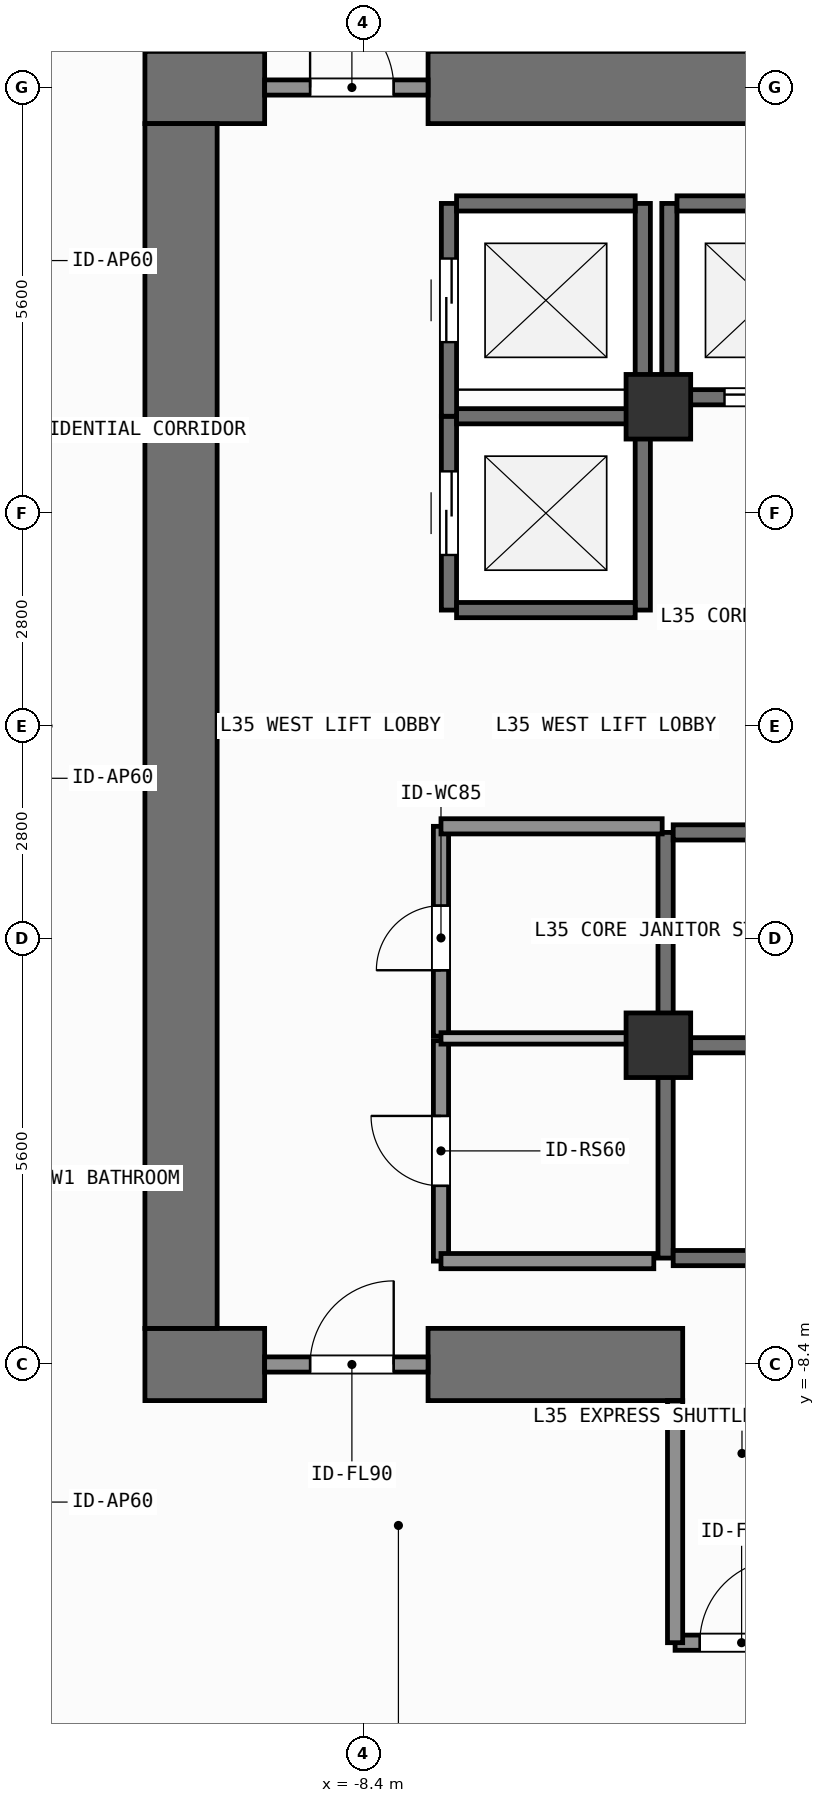
"""IFC4 building model, lengths in metres.
Left out: names, types, materials, properties, quantities, classifications, styles, units other than length and angle.
Written with IfcOpenShell. Run it as: python <this file> out.ifc"""

import sys

from ifc_helpers import new_model, si_unit, direction, frame, frame_2d, origin, origin_2d, place, context, subcontext, project, spatial, rectangle, extrude, element, fill, save


model = new_model("IFC4")
c1 = context("Model", 3, precision=1e-05, world=origin(), true_north=direction((0.0, 1.0)))
c2 = subcontext(c1, "Body", "Model", "MODEL_VIEW")
j1 = project(units=[si_unit("LENGTHUNIT", "METRE"), si_unit("PLANEANGLEUNIT", "RADIAN")], contexts=[c1])
p1 = place(None, origin())
s1 = spatial("IfcSite", under=j1, at=p1, CompositionType="ELEMENT")
p2 = place(p1, origin())
s2 = spatial("IfcBuilding", under=s1, at=p2, CompositionType="ELEMENT")
p3 = place(p2, frame((0.0, 0.0, 140.7)))
s3 = spatial("IfcBuildingStorey", under=s2, at=p3, CompositionType="ELEMENT", Elevation=140.7)
p4 = place(p3, frame((-11.275, -8.4, 0.0), z_axis=(0.0, 0.0, 1.0), x_axis=(1.0, 0.0, 0.0)))
e1 = element("IfcWall", 1, at=p4, inside=s3, PredefinedType="SHEAR", context=c2, shape_type="SweptSolid", body=[
    extrude(rectangle(XDim=1.575, YDim=0.95, at=frame_2d((0.788, 0.0))), origin(), (0.0, 0.0, 1.0), 3.9),
])
p5 = place(p3, frame((-7.55, -8.4, 0.0), z_axis=(0.0, 0.0, 1.0), x_axis=(1.0, 0.0, 0.0)))
e2 = element("IfcWall", 2, at=p5, inside=s3, PredefinedType="SHEAR", context=c2, shape_type="SweptSolid", body=[
    extrude(rectangle(XDim=3.35, YDim=0.95, at=frame_2d((1.675, 0.0))), origin(), (0.0, 0.0, 1.0), 3.9),
])
p6 = place(p3, frame((-11.275, 8.4, 0.0), z_axis=(0.0, 0.0, 1.0), x_axis=(1.0, 0.0, 0.0)))
e3 = element("IfcWall", 3, at=p6, inside=s3, PredefinedType="SHEAR", context=c2, shape_type="SweptSolid", body=[
    extrude(rectangle(XDim=1.575, YDim=0.95, at=frame_2d((0.788, 0.0))), origin(), (0.0, 0.0, 1.0), 3.9),
])
p7 = place(p3, frame((-7.55, 8.4, 0.0), z_axis=(0.0, 0.0, 1.0), x_axis=(1.0, 0.0, 0.0)))
e4 = element("IfcWall", 4, at=p7, inside=s3, PredefinedType="SHEAR", context=c2, shape_type="SweptSolid", body=[
    extrude(rectangle(XDim=16.425, YDim=0.95, at=frame_2d((8.212, 0.0))), origin(), (0.0, 0.0, 1.0), 3.9),
])
p8 = place(p3, frame((-10.8, -7.925, 0.0), z_axis=(0.0, 0.0, 1.0), x_axis=(0.0, 1.0, 0.0)))
e5 = element("IfcWall", 5, at=p8, inside=s3, PredefinedType="SHEAR", context=c2, shape_type="SweptSolid", body=[
    extrude(rectangle(XDim=15.85, YDim=0.95, at=frame_2d((7.925, 0.0))), origin(), (0.0, 0.0, 1.0), 3.9),
])
for number, where, z_axis, x_axis in (
    (6, (-4.52, -4.2, 0.0), (0.0, 0.0, 1.0), (1.0, 0.0, 0.0)),
    (7, (-4.52, 4.2, 0.0), (0.0, 0.0, 1.0), (1.0, 0.0, 0.0)),
):
    element("IfcColumn", number, at=place(p3, frame(where, z_axis=z_axis, x_axis=x_axis)), inside=s3, PredefinedType="COLUMN", context=c2, shape_type="SweptSolid", body=[
        extrude(rectangle(XDim=0.85, YDim=0.85, at=origin_2d()), origin(), (0.0, 0.0, 1.0), 3.9),
    ])
p9 = place(p3, frame((-7.275, 1.525, 0.0), z_axis=(0.0, 0.0, 1.0), x_axis=(0.0, 1.0, 0.0)))
e8 = element("IfcWall", 8, at=p9, inside=s3, PredefinedType="SHEAR", context=c2, shape_type="SweptSolid", body=[
    extrude(rectangle(XDim=2.55, YDim=0.2, at=frame_2d((1.275, 0.0))), origin(), (0.0, 0.0, 1.0), 3.68),
])
p10 = place(p9, frame((0.725, 0.0, 0.0)))
e9 = element("IfcOpeningElement", 9, at=p10, cuts=e8, PredefinedType="OPENING", context=c2, shape_type="SweptSolid", body=[
    extrude(rectangle(XDim=1.1, YDim=2.2, at=frame_2d((0.55, 1.1))), frame((0.0, 0.11, 0.0), z_axis=(0.0, -1.0, 0.0), x_axis=(1.0, 0.0, 0.0)), (0.0, 0.0, 1.0), 0.22),
])
p11 = place(p3, frame((-4.725, 1.525, 0.0), z_axis=(0.0, 0.0, 1.0), x_axis=(0.0, 1.0, 0.0)))
e10 = element("IfcWall", 10, at=p11, inside=s3, PredefinedType="SHEAR", context=c2, shape_type="SweptSolid", body=[
    extrude(rectangle(XDim=2.55, YDim=0.2, at=frame_2d((1.275, 0.0))), origin(), (0.0, 0.0, 1.0), 3.68),
])
for number, where, z_axis, x_axis in (
    (11, (-7.175, 1.525, 0.0), (0.0, 0.0, 1.0), (1.0, 0.0, 0.0)),
    (12, (-7.175, 4.075, 0.0), (0.0, 0.0, 1.0), (1.0, 0.0, 0.0)),
):
    element("IfcWall", number, at=place(p3, frame(where, z_axis=z_axis, x_axis=x_axis)), inside=s3, PredefinedType="SHEAR", context=c2, shape_type="SweptSolid", body=[
        extrude(rectangle(XDim=2.35, YDim=0.2, at=frame_2d((1.175, 0.0))), origin(), (0.0, 0.0, 1.0), 3.68),
    ])
p12 = place(p3, frame((-7.275, 4.075, 0.0), z_axis=(0.0, 0.0, 1.0), x_axis=(0.0, 1.0, 0.0)))
e13 = element("IfcWall", 13, at=p12, inside=s3, PredefinedType="SHEAR", context=c2, shape_type="SweptSolid", body=[
    extrude(rectangle(XDim=2.8, YDim=0.2, at=frame_2d((1.4, 0.0))), origin(), (0.0, 0.0, 1.0), 3.68),
])
p13 = place(p12, frame((0.975, 0.0, 0.0)))
e14 = element("IfcOpeningElement", 14, at=p13, cuts=e13, PredefinedType="OPENING", context=c2, shape_type="SweptSolid", body=[
    extrude(rectangle(XDim=1.1, YDim=2.2, at=frame_2d((0.55, 1.1))), frame((0.0, 0.11, 0.0), z_axis=(0.0, -1.0, 0.0), x_axis=(1.0, 0.0, 0.0)), (0.0, 0.0, 1.0), 0.22),
])
p14 = place(p3, frame((-4.725, 4.075, 0.0), z_axis=(0.0, 0.0, 1.0), x_axis=(0.0, 1.0, 0.0)))
e15 = element("IfcWall", 15, at=p14, inside=s3, PredefinedType="SHEAR", context=c2, shape_type="SweptSolid", body=[
    extrude(rectangle(XDim=2.8, YDim=0.2, at=frame_2d((1.4, 0.0))), origin(), (0.0, 0.0, 1.0), 3.68),
])
p15 = place(p3, frame((-7.175, 6.875, 0.0), z_axis=(0.0, 0.0, 1.0), x_axis=(1.0, 0.0, 0.0)))
e16 = element("IfcWall", 16, at=p15, inside=s3, PredefinedType="SHEAR", context=c2, shape_type="SweptSolid", body=[
    extrude(rectangle(XDim=2.35, YDim=0.2, at=frame_2d((1.175, 0.0))), origin(), (0.0, 0.0, 1.0), 3.68),
])
p16 = place(p3, frame((-4.375, 4.325, 0.0), z_axis=(0.0, 0.0, 1.0), x_axis=(0.0, 1.0, 0.0)))
e17 = element("IfcWall", 17, at=p16, inside=s3, PredefinedType="SHEAR", context=c2, shape_type="SweptSolid", body=[
    extrude(rectangle(XDim=2.55, YDim=0.2, at=frame_2d((1.275, 0.0))), origin(), (0.0, 0.0, 1.0), 3.68),
])
p17 = place(p3, frame((-4.275, 4.325, 0.0), z_axis=(0.0, 0.0, 1.0), x_axis=(1.0, 0.0, 0.0)))
e18 = element("IfcWall", 18, at=p17, inside=s3, PredefinedType="SHEAR", context=c2, shape_type="SweptSolid", body=[
    extrude(rectangle(XDim=2.35, YDim=0.2, at=frame_2d((1.175, 0.0))), origin(), (0.0, 0.0, 1.0), 3.68),
])
p18 = place(p17, frame((0.625, 0.0, 0.0)))
e19 = element("IfcOpeningElement", 19, at=p18, cuts=e18, PredefinedType="OPENING", context=c2, shape_type="SweptSolid", body=[
    extrude(rectangle(XDim=1.1, YDim=2.2, at=frame_2d((0.55, 1.1))), frame((0.0, 0.11, 0.0), z_axis=(0.0, -1.0, 0.0), x_axis=(1.0, 0.0, 0.0)), (0.0, 0.0, 1.0), 0.22),
])
p19 = place(p3, frame((-4.275, 6.875, 0.0), z_axis=(0.0, 0.0, 1.0), x_axis=(1.0, 0.0, 0.0)))
e20 = element("IfcWall", 20, at=p19, inside=s3, PredefinedType="SHEAR", context=c2, shape_type="SweptSolid", body=[
    extrude(rectangle(XDim=2.35, YDim=0.2, at=frame_2d((1.175, 0.0))), origin(), (0.0, 0.0, 1.0), 3.68),
])
p20 = place(p3, frame((-4.425, -7.0, 0.0), z_axis=(0.0, 0.0, 1.0), x_axis=(0.0, 1.0, 0.0)))
e21 = element("IfcWall", 21, at=p20, inside=s3, PredefinedType="SHEAR", context=c2, shape_type="SweptSolid", body=[
    extrude(rectangle(XDim=2.8, YDim=0.2, at=frame_2d((1.4, 0.0))), origin(), (0.0, 0.0, 1.0), 3.68),
])
for number, where, z_axis, x_axis in (
    (22, (-4.325, -7.0, 0.0), (0.0, 0.0, 1.0), (1.0, 0.0, 0.0)),
    (23, (-4.325, -4.2, 0.0), (0.0, 0.0, 1.0), (1.0, 0.0, 0.0)),
):
    element("IfcWall", number, at=place(p3, frame(where, z_axis=z_axis, x_axis=x_axis)), inside=s3, PredefinedType="SHEAR", context=c2, shape_type="SweptSolid", body=[
        extrude(rectangle(XDim=2.45, YDim=0.2, at=frame_2d((1.225, 0.0))), origin(), (0.0, 0.0, 1.0), 3.68),
    ])
p21 = place(p3, frame((-4.425, -4.2, 0.0), z_axis=(0.0, 0.0, 1.0), x_axis=(0.0, 1.0, 0.0)))
e24 = element("IfcWall", 24, at=p21, inside=s3, PredefinedType="SHEAR", context=c2, shape_type="SweptSolid", body=[
    extrude(rectangle(XDim=2.8, YDim=0.2, at=frame_2d((1.4, 0.0))), origin(), (0.0, 0.0, 1.0), 3.68),
])
p22 = place(p3, frame((-4.325, -1.4, 0.0), z_axis=(0.0, 0.0, 1.0), x_axis=(1.0, 0.0, 0.0)))
e25 = element("IfcWall", 25, at=p22, inside=s3, PredefinedType="SHEAR", context=c2, shape_type="SweptSolid", body=[
    extrude(rectangle(XDim=2.45, YDim=0.2, at=frame_2d((1.225, 0.0))), origin(), (0.0, 0.0, 1.0), 3.68),
])
p23 = place(p3, frame((-9.7, -8.4, 0.0), z_axis=(0.0, 0.0, 1.0), x_axis=(1.0, 0.0, 0.0)))
e26 = element("IfcWall", 26, at=p23, inside=s3, PredefinedType="SOLIDWALL", context=c2, shape_type="SweptSolid", body=[
    extrude(rectangle(XDim=2.15, YDim=0.2, at=frame_2d((1.075, 0.0))), origin(), (0.0, 0.0, 1.0), 2.72),
])
p24 = place(p23, frame((0.598, 0.0, 0.0)))
e27 = element("IfcOpeningElement", 27, at=p24, cuts=e26, PredefinedType="OPENING", context=c2, shape_type="SweptSolid", body=[
    extrude(rectangle(XDim=1.1, YDim=2.15, at=frame_2d((0.55, 1.075))), frame((0.0, 0.11, 0.0), z_axis=(0.0, -1.0, 0.0), x_axis=(1.0, 0.0, 0.0)), (0.0, 0.0, 1.0), 0.22),
])
p25 = place(p3, frame((-9.7, 8.4, 0.0), z_axis=(0.0, 0.0, 1.0), x_axis=(1.0, 0.0, 0.0)))
e28 = element("IfcWall", 28, at=p25, inside=s3, PredefinedType="SOLIDWALL", context=c2, shape_type="SweptSolid", body=[
    extrude(rectangle(XDim=2.15, YDim=0.2, at=frame_2d((1.075, 0.0))), origin(), (0.0, 0.0, 1.0), 2.72),
])
p26 = place(p25, frame((0.598, 0.0, 0.0)))
e29 = element("IfcOpeningElement", 29, at=p26, cuts=e28, PredefinedType="OPENING", context=c2, shape_type="SweptSolid", body=[
    extrude(rectangle(XDim=1.1, YDim=2.15, at=frame_2d((0.55, 1.075))), frame((0.0, 0.11, 0.0), z_axis=(0.0, -1.0, 0.0), x_axis=(1.0, 0.0, 0.0)), (0.0, 0.0, 1.0), 0.22),
])
p27 = place(p3, frame((-4.3, -12.06, 0.0), z_axis=(0.0, 0.0, 1.0), x_axis=(1.0, 0.0, 0.0)))
e30 = element("IfcWall", 30, at=p27, inside=s3, PredefinedType="SOLIDWALL", context=c2, shape_type="SweptSolid", body=[
    extrude(rectangle(XDim=1.75, YDim=0.2, at=frame_2d((0.875, 0.0))), origin(), (0.0, 0.0, 1.0), 3.68),
])
p28 = place(p27, frame((0.325, 0.0, 0.0)))
e31 = element("IfcOpeningElement", 31, at=p28, cuts=e30, PredefinedType="OPENING", context=c2, shape_type="SweptSolid", body=[
    extrude(rectangle(XDim=1.1, YDim=2.15, at=frame_2d((0.55, 1.075))), frame((0.0, 0.11, 0.0), z_axis=(0.0, -1.0, 0.0), x_axis=(1.0, 0.0, 0.0)), (0.0, 0.0, 1.0), 0.22),
])
p29 = place(p3, frame((-7.38, -7.04, 0.0), z_axis=(0.0, 0.0, 1.0), x_axis=(0.0, 1.0, 0.0)))
e32 = element("IfcWall", 32, at=p29, inside=s3, PredefinedType="SOLIDWALL", context=c2, shape_type="SweptSolid", body=[
    extrude(rectangle(XDim=2.9, YDim=0.2, at=frame_2d((1.45, 0.0))), origin(), (0.0, 0.0, 1.0), 3.68),
])
p30 = place(p29, frame((0.99, 0.0, 0.0)))
e33 = element("IfcOpeningElement", 33, at=p30, cuts=e32, PredefinedType="OPENING", context=c2, shape_type="SweptSolid", body=[
    extrude(rectangle(XDim=0.92, YDim=2.1, at=frame_2d((0.46, 1.05))), frame((0.0, 0.11, 0.0), z_axis=(0.0, -1.0, 0.0), x_axis=(1.0, 0.0, 0.0)), (0.0, 0.0, 1.0), 0.22),
])
p31 = place(p3, frame((-7.38, -4.08, 0.0), z_axis=(0.0, 0.0, 1.0), x_axis=(0.0, 1.0, 0.0)))
e34 = element("IfcWall", 34, at=p31, inside=s3, PredefinedType="SOLIDWALL", context=c2, shape_type="SweptSolid", body=[
    extrude(rectangle(XDim=2.76, YDim=0.2, at=frame_2d((1.38, 0.0))), origin(), (0.0, 0.0, 1.0), 3.68),
])
p32 = place(p31, frame((0.867, 0.0, 0.0)))
e35 = element("IfcOpeningElement", 35, at=p32, cuts=e34, PredefinedType="OPENING", context=c2, shape_type="SweptSolid", body=[
    extrude(rectangle(XDim=0.85, YDim=2.1, at=frame_2d((0.425, 1.05))), frame((0.0, 0.11, 0.0), z_axis=(0.0, -1.0, 0.0), x_axis=(1.0, 0.0, 0.0)), (0.0, 0.0, 1.0), 0.22),
])
p33 = place(p3, frame((-4.3, -12.06, 0.0), z_axis=(0.0, 0.0, 1.0), x_axis=(0.0, 1.0, 0.0)))
e36 = element("IfcWall", 36, at=p33, inside=s3, PredefinedType="SOLIDWALL", context=c2, shape_type="SweptSolid", body=[
    extrude(rectangle(XDim=3.185, YDim=0.2, at=frame_2d((1.593, 0.0))), origin(), (0.0, 0.0, 1.0), 3.68),
])
p34 = place(p3, frame((-7.38, -1.32, 0.0), z_axis=(0.0, 0.0, 1.0), x_axis=(1.0, 0.0, 0.0)))
e37 = element("IfcWall", 37, at=p34, inside=s3, PredefinedType="SOLIDWALL", context=c2, shape_type="SweptSolid", body=[
    extrude(rectangle(XDim=2.91, YDim=0.2, at=frame_2d((1.455, 0.0))), origin(), (0.0, 0.0, 1.0), 3.68),
])
p35 = place(p3, frame((-7.38, -7.04, 0.0), z_axis=(0.0, 0.0, 1.0), x_axis=(1.0, 0.0, 0.0)))
e38 = element("IfcWall", 38, at=p35, inside=s3, PredefinedType="SOLIDWALL", context=c2, shape_type="SweptSolid", body=[
    extrude(rectangle(XDim=2.8, YDim=0.2, at=frame_2d((1.4, 0.0))), origin(), (0.0, 0.0, 1.0), 3.68),
])
p36 = place(p3, frame((-7.38, -4.11, 0.0), z_axis=(0.0, 0.0, 1.0), x_axis=(1.0, 0.0, 0.0)))
e39 = element("IfcWall", 39, at=p36, inside=s3, PredefinedType="PARTITIONING", context=c2, shape_type="SweptSolid", body=[
    extrude(rectangle(XDim=2.8, YDim=0.15, at=frame_2d((1.4, 0.0))), origin(), (0.0, 0.0, 1.0), 3.68),
])
p37 = place(p10, origin())
e40 = element("IfcDoor", 40, at=p37, inside=s3, OperationType="SLIDING_TO_LEFT", PredefinedType="DOOR", context=c2, shape_type="SweptSolid", body=[
    extrude(rectangle(XDim=1.1, YDim=2.2, at=frame_2d((0.55, 1.1))), frame((0.0, 0.025, 0.0), z_axis=(0.0, -1.0, 0.0), x_axis=(1.0, 0.0, 0.0)), (0.0, 0.0, 1.0), 0.05),
])
fill(e9, e40)
p38 = place(p13, origin())
e41 = element("IfcDoor", 41, at=p38, inside=s3, OperationType="SLIDING_TO_LEFT", PredefinedType="DOOR", context=c2, shape_type="SweptSolid", body=[
    extrude(rectangle(XDim=1.1, YDim=2.2, at=frame_2d((0.55, 1.1))), frame((0.0, 0.025, 0.0), z_axis=(0.0, -1.0, 0.0), x_axis=(1.0, 0.0, 0.0)), (0.0, 0.0, 1.0), 0.05),
])
fill(e14, e41)
p39 = place(p18, origin())
e42 = element("IfcDoor", 42, at=p39, inside=s3, OperationType="SLIDING_TO_LEFT", PredefinedType="DOOR", context=c2, shape_type="SweptSolid", body=[
    extrude(rectangle(XDim=1.1, YDim=2.2, at=frame_2d((0.55, 1.1))), frame((0.0, 0.025, 0.0), z_axis=(0.0, -1.0, 0.0), x_axis=(1.0, 0.0, 0.0)), (0.0, 0.0, 1.0), 0.05),
])
fill(e19, e42)
p40 = place(p24, origin())
e43 = element("IfcDoor", 43, at=p40, inside=s3, OperationType="SINGLE_SWING_RIGHT", PredefinedType="DOOR", context=c2, shape_type="SweptSolid", body=[
    extrude(rectangle(XDim=1.1, YDim=2.15, at=frame_2d((0.55, 1.075))), frame((0.0, 0.025, 0.0), z_axis=(0.0, -1.0, 0.0), x_axis=(1.0, 0.0, 0.0)), (0.0, 0.0, 1.0), 0.05),
])
fill(e27, e43)
p41 = place(p26, origin())
e44 = element("IfcDoor", 44, at=p41, inside=s3, OperationType="SINGLE_SWING_LEFT", PredefinedType="DOOR", context=c2, shape_type="SweptSolid", body=[
    extrude(rectangle(XDim=1.1, YDim=2.15, at=frame_2d((0.55, 1.075))), frame((0.0, 0.025, 0.0), z_axis=(0.0, -1.0, 0.0), x_axis=(1.0, 0.0, 0.0)), (0.0, 0.0, 1.0), 0.05),
])
fill(e29, e44)
p42 = place(p28, origin())
e45 = element("IfcDoor", 45, at=p42, inside=s3, OperationType="SINGLE_SWING_RIGHT", PredefinedType="DOOR", context=c2, shape_type="SweptSolid", body=[
    extrude(rectangle(XDim=1.1, YDim=2.15, at=frame_2d((0.55, 1.075))), frame((0.0, 0.025, 0.0), z_axis=(0.0, -1.0, 0.0), x_axis=(1.0, 0.0, 0.0)), (0.0, 0.0, 1.0), 0.05),
])
fill(e31, e45)
p43 = place(p30, origin())
e46 = element("IfcDoor", 46, at=p43, inside=s3, OperationType="SINGLE_SWING_RIGHT", PredefinedType="DOOR", context=c2, shape_type="SweptSolid", body=[
    extrude(rectangle(XDim=0.92, YDim=2.1, at=frame_2d((0.46, 1.05))), frame((0.0, 0.025, 0.0), z_axis=(0.0, -1.0, 0.0), x_axis=(1.0, 0.0, 0.0)), (0.0, 0.0, 1.0), 0.05),
])
fill(e33, e46)
p44 = place(p32, origin())
e47 = element("IfcDoor", 47, at=p44, inside=s3, OperationType="SINGLE_SWING_LEFT", PredefinedType="DOOR", context=c2, shape_type="SweptSolid", body=[
    extrude(rectangle(XDim=0.85, YDim=2.1, at=frame_2d((0.425, 1.05))), frame((0.0, 0.025, 0.0), z_axis=(0.0, -1.0, 0.0), x_axis=(1.0, 0.0, 0.0)), (0.0, 0.0, 1.0), 0.05),
])
fill(e35, e47)
save(model, sys.argv[1])
